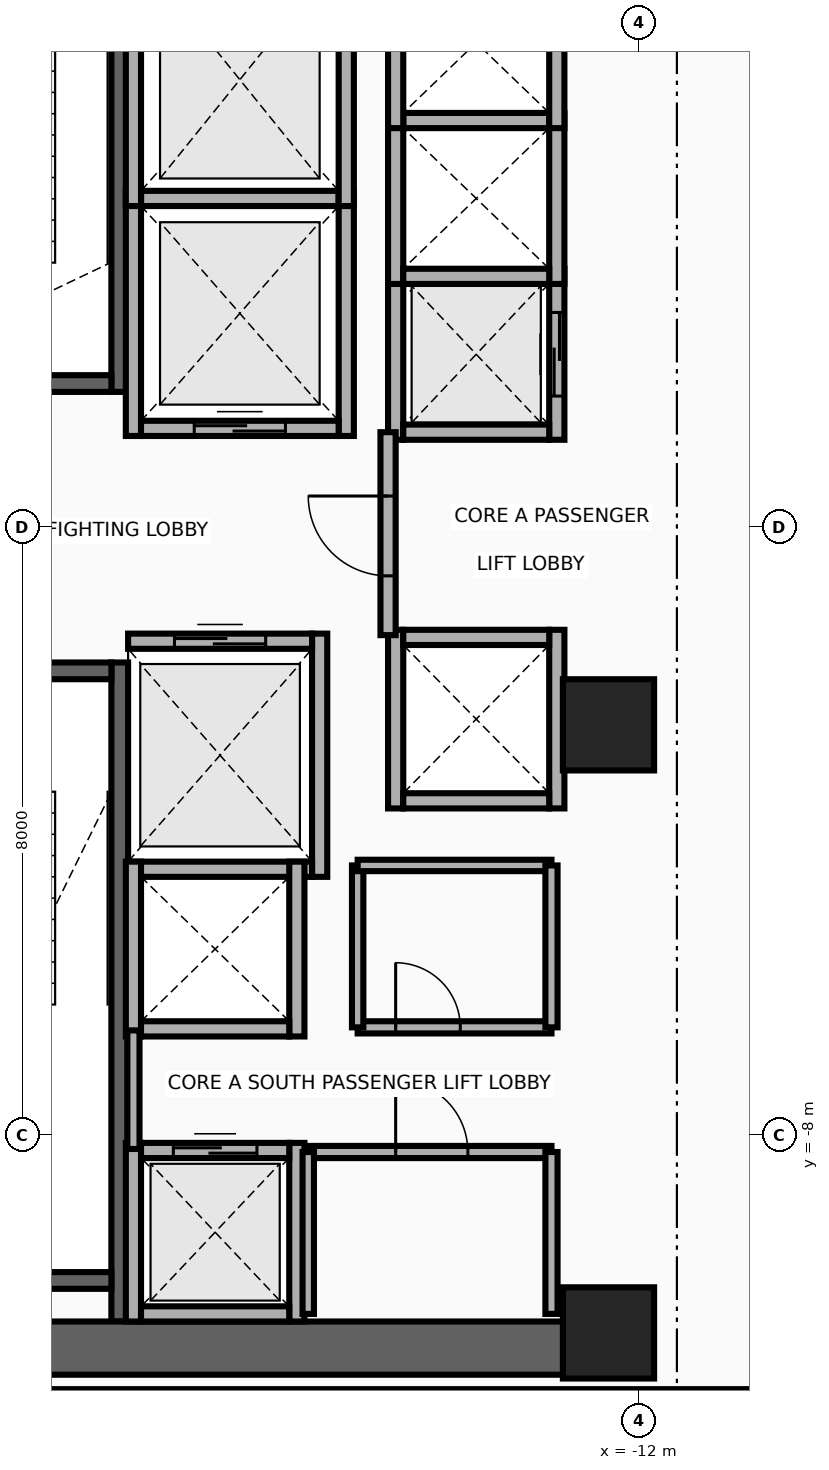
"""IFC4 building model, lengths in metres.
Left out: names, types, materials, properties, quantities, classifications, styles, units other than length and angle.
Written with IfcOpenShell. Run it as: python <this file> out.ifc"""

import sys

from ifc_helpers import new_model, si_unit, direction, frame, frame_2d, origin, origin_2d, place, context, subcontext, project, spatial, rectangle, extrude, source, transform, mapped, element, fill, save


model = new_model("IFC4")
c1 = context("Model", 3, precision=1e-05, world=origin(), true_north=direction((0.0, 1.0)))
c2 = subcontext(c1, "Body", "Model", "MODEL_VIEW")
j1 = project(units=[si_unit("LENGTHUNIT", "METRE"), si_unit("PLANEANGLEUNIT", "RADIAN")], contexts=[c1])
p1 = place(None, origin())
s1 = spatial("IfcSite", under=j1, at=p1, CompositionType="ELEMENT")
p2 = place(p1, origin())
s2 = spatial("IfcBuilding", under=s1, at=p2, CompositionType="ELEMENT")
p3 = place(p2, frame((0.0, 0.0, 127.9)))
s3 = spatial("IfcBuildingStorey", under=s2, at=p3, CompositionType="ELEMENT", Elevation=127.9)
p4 = place(p3, frame((-18.83, 1.78, 0.0), z_axis=(0.0, 0.0, 1.0), x_axis=(0.0, 1.0, 0.0)))
e1 = element("IfcWall", 1, at=p4, inside=s3, PredefinedType="SHEAR", context=c2, shape_type="SweptSolid", body=[
    extrude(rectangle(XDim=8.67, YDim=0.22, at=frame_2d((4.335, 0.0))), origin(), (0.0, 0.0, 1.0), 3.46),
])
p5 = place(p3, frame((-22.05, 1.89, 0.0), z_axis=(0.0, 0.0, 1.0), x_axis=(1.0, 0.0, 0.0)))
e2 = element("IfcWall", 2, at=p5, inside=s3, PredefinedType="SHEAR", context=c2, shape_type="SweptSolid", body=[
    extrude(rectangle(XDim=3.11, YDim=0.22, at=frame_2d((1.555, 0.0))), origin(), (0.0, 0.0, 1.0), 3.46),
])
p6 = place(p5, frame((1.0, 0.0, 0.0)))
e3 = element("IfcOpeningElement", 3, at=p6, cuts=e2, PredefinedType="OPENING", context=c2, shape_type="SweptSolid", body=[
    extrude(rectangle(XDim=1.1, YDim=2.15, at=frame_2d((0.55, 1.075))), frame((0.0, 0.125, 0.0), z_axis=(0.0, -1.0, 0.0), x_axis=(1.0, 0.0, 0.0)), (0.0, 0.0, 1.0), 0.25),
])
p7 = place(p3, frame((-18.83, -10.45, 0.0), z_axis=(0.0, 0.0, 1.0), x_axis=(0.0, 1.0, 0.0)))
e4 = element("IfcWall", 4, at=p7, inside=s3, PredefinedType="SHEAR", context=c2, shape_type="SweptSolid", body=[
    extrude(rectangle(XDim=8.67, YDim=0.22, at=frame_2d((4.335, 0.0))), origin(), (0.0, 0.0, 1.0), 3.46),
])
p8 = place(p3, frame((-22.05, -9.91, 0.0), z_axis=(0.0, 0.0, 1.0), x_axis=(1.0, 0.0, 0.0)))
e5 = element("IfcWall", 5, at=p8, inside=s3, PredefinedType="SHEAR", context=c2, shape_type="SweptSolid", body=[
    extrude(rectangle(XDim=3.11, YDim=0.22, at=frame_2d((1.555, 0.0))), origin(), (0.0, 0.0, 1.0), 3.46),
])
p9 = place(p3, frame((-22.05, -1.89, 0.0), z_axis=(0.0, 0.0, 1.0), x_axis=(1.0, 0.0, 0.0)))
e6 = element("IfcWall", 6, at=p9, inside=s3, PredefinedType="SHEAR", context=c2, shape_type="SweptSolid", body=[
    extrude(rectangle(XDim=3.11, YDim=0.22, at=frame_2d((1.555, 0.0))), origin(), (0.0, 0.0, 1.0), 3.46),
])
p10 = place(p9, frame((1.0, 0.0, 0.0)))
e7 = element("IfcOpeningElement", 7, at=p10, cuts=e6, PredefinedType="OPENING", context=c2, shape_type="SweptSolid", body=[
    extrude(rectangle(XDim=1.1, YDim=2.15, at=frame_2d((0.55, 1.075))), frame((0.0, 0.125, 0.0), z_axis=(0.0, -1.0, 0.0), x_axis=(1.0, 0.0, 0.0)), (0.0, 0.0, 1.0), 0.25),
])
p11 = place(p3, frame((-22.65, -10.8, 0.0), z_axis=(0.0, 0.0, 1.0), x_axis=(1.0, 0.0, 0.0)))
e8 = element("IfcWall", 8, at=p11, inside=s3, PredefinedType="SHEAR", context=c2, shape_type="SweptSolid", body=[
    extrude(rectangle(XDim=10.25, YDim=0.7, at=frame_2d((5.125, 0.0))), origin(), (0.0, 0.0, 1.0), 3.46),
])
m1 = source(origin(), c2, "Body", "SweptSolid", [
    extrude(rectangle(XDim=1.2, YDim=1.2, at=origin_2d()), origin(), (0.0, 0.0, 1.0), 3.7),
])
for number, where, z_axis, x_axis in (
    (9, (-12.4, -10.6, 0.0), (0.0, 0.0, 1.0), (1.0, 0.0, 0.0)),
    (10, (-12.4, -2.6, 0.0), (0.0, 0.0, 1.0), (1.0, 0.0, 0.0)),
):
    element("IfcColumn", number, at=place(p3, frame(where, z_axis=z_axis, x_axis=x_axis)), inside=s3, PredefinedType="COLUMN", context=c2, shape_type="MappedRepresentation", body=[
        mapped(m1, transform((0.0, 0.0, 0.0), x_axis=(1.0, 0.0, 0.0), y_axis=(0.0, 1.0, 0.0), z_axis=(0.0, 0.0, 1.0), scale=1.0)),
    ])
for number, where, z_axis, x_axis in (
    (11, (-18.65, 1.2, 0.0), (0.0, 0.0, 1.0), (0.0, 1.0, 0.0)),
    (12, (-15.85, 1.2, 0.0), (0.0, 0.0, 1.0), (0.0, 1.0, 0.0)),
):
    element("IfcWall", number, at=place(p3, frame(where, z_axis=z_axis, x_axis=x_axis)), inside=s3, PredefinedType="MOVABLE", context=c2, shape_type="SweptSolid", body=[
        extrude(rectangle(XDim=3.225, YDim=0.2, at=frame_2d((1.613, 0.0))), origin(), (0.0, 0.0, 1.0), 3.46),
    ])
p12 = place(p3, frame((-18.55, 1.3, 0.0), z_axis=(0.0, 0.0, 1.0), x_axis=(1.0, 0.0, 0.0)))
e13 = element("IfcWall", 13, at=p12, inside=s3, PredefinedType="MOVABLE", context=c2, shape_type="SweptSolid", body=[
    extrude(rectangle(XDim=2.6, YDim=0.2, at=frame_2d((1.3, 0.0))), origin(), (0.0, 0.0, 1.0), 3.46),
])
p13 = place(p12, frame((0.7, 0.0, 0.0)))
e14 = element("IfcOpeningElement", 14, at=p13, cuts=e13, PredefinedType="OPENING", context=c2, shape_type="SweptSolid", body=[
    extrude(rectangle(XDim=1.2, YDim=2.1, at=frame_2d((0.6, 1.05))), frame((0.0, 0.115, 0.0), z_axis=(0.0, -1.0, 0.0), x_axis=(1.0, 0.0, 0.0)), (0.0, 0.0, 1.0), 0.23),
])
p14 = place(p3, frame((-18.55, 4.325, 0.0), z_axis=(0.0, 0.0, 1.0), x_axis=(1.0, 0.0, 0.0)))
e15 = element("IfcWall", 15, at=p14, inside=s3, PredefinedType="MOVABLE", context=c2, shape_type="SweptSolid", body=[
    extrude(rectangle(XDim=2.6, YDim=0.2, at=frame_2d((1.3, 0.0))), origin(), (0.0, 0.0, 1.0), 3.46),
])
p15 = place(p3, frame((-16.2, -4.6, 0.0), z_axis=(0.0, 0.0, 1.0), x_axis=(0.0, 1.0, 0.0)))
e16 = element("IfcWall", 16, at=p15, inside=s3, PredefinedType="MOVABLE", context=c2, shape_type="SweptSolid", body=[
    extrude(rectangle(XDim=3.2, YDim=0.2, at=frame_2d((1.6, 0.0))), origin(), (0.0, 0.0, 1.0), 3.46),
])
p16 = place(p3, frame((-18.72, -4.5, 0.0), z_axis=(0.0, 0.0, 1.0), x_axis=(1.0, 0.0, 0.0)))
e17 = element("IfcWall", 17, at=p16, inside=s3, PredefinedType="MOVABLE", context=c2, shape_type="SweptSolid", body=[
    extrude(rectangle(XDim=2.42, YDim=0.2, at=frame_2d((1.21, 0.0))), origin(), (0.0, 0.0, 1.0), 3.46),
])
p17 = place(p3, frame((-18.72, -1.5, 0.0), z_axis=(0.0, 0.0, 1.0), x_axis=(1.0, 0.0, 0.0)))
e18 = element("IfcWall", 18, at=p17, inside=s3, PredefinedType="MOVABLE", context=c2, shape_type="SweptSolid", body=[
    extrude(rectangle(XDim=2.42, YDim=0.2, at=frame_2d((1.21, 0.0))), origin(), (0.0, 0.0, 1.0), 3.46),
])
p18 = place(p17, frame((0.61, 0.0, 0.0)))
e19 = element("IfcOpeningElement", 19, at=p18, cuts=e18, PredefinedType="OPENING", context=c2, shape_type="SweptSolid", body=[
    extrude(rectangle(XDim=1.2, YDim=2.1, at=frame_2d((0.6, 1.05))), frame((0.0, 0.115, 0.0), z_axis=(0.0, -1.0, 0.0), x_axis=(1.0, 0.0, 0.0)), (0.0, 0.0, 1.0), 0.23),
])
for number, where, z_axis, x_axis in (
    (20, (-18.65, 4.225, 0.0), (0.0, 0.0, 1.0), (0.0, 1.0, 0.0)),
    (21, (-15.85, 4.225, 0.0), (0.0, 0.0, 1.0), (0.0, 1.0, 0.0)),
):
    element("IfcWall", number, at=place(p3, frame(where, z_axis=z_axis, x_axis=x_axis)), inside=s3, PredefinedType="MOVABLE", context=c2, shape_type="SweptSolid", body=[
        extrude(rectangle(XDim=3.325, YDim=0.2, at=frame_2d((1.663, 0.0))), origin(), (0.0, 0.0, 1.0), 3.46),
    ])
for number, where, z_axis, x_axis in (
    (22, (-18.65, -10.45, 0.0), (0.0, 0.0, 1.0), (0.0, 1.0, 0.0)),
    (23, (-16.5, -10.45, 0.0), (0.0, 0.0, 1.0), (0.0, 1.0, 0.0)),
):
    element("IfcWall", number, at=place(p3, frame(where, z_axis=z_axis, x_axis=x_axis)), inside=s3, PredefinedType="MOVABLE", context=c2, shape_type="SweptSolid", body=[
        extrude(rectangle(XDim=2.35, YDim=0.2, at=frame_2d((1.175, 0.0))), origin(), (0.0, 0.0, 1.0), 2.666),
    ])
p19 = place(p3, frame((-18.55, -10.35, 0.0), z_axis=(0.0, 0.0, 1.0), x_axis=(1.0, 0.0, 0.0)))
e24 = element("IfcWall", 24, at=p19, inside=s3, PredefinedType="MOVABLE", context=c2, shape_type="SweptSolid", body=[
    extrude(rectangle(XDim=1.95, YDim=0.2, at=frame_2d((0.975, 0.0))), origin(), (0.0, 0.0, 1.0), 2.666),
])
p20 = place(p3, frame((-18.55, -8.2, 0.0), z_axis=(0.0, 0.0, 1.0), x_axis=(1.0, 0.0, 0.0)))
e25 = element("IfcWall", 25, at=p20, inside=s3, PredefinedType="MOVABLE", context=c2, shape_type="SweptSolid", body=[
    extrude(rectangle(XDim=1.95, YDim=0.2, at=frame_2d((0.975, 0.0))), origin(), (0.0, 0.0, 1.0), 3.46),
])
p21 = place(p20, frame((0.425, 0.0, 0.0)))
e26 = element("IfcOpeningElement", 26, at=p21, cuts=e25, PredefinedType="OPENING", context=c2, shape_type="SweptSolid", body=[
    extrude(rectangle(XDim=1.1, YDim=2.1, at=frame_2d((0.55, 1.05))), frame((0.0, 0.115, 0.0), z_axis=(0.0, -1.0, 0.0), x_axis=(1.0, 0.0, 0.0)), (0.0, 0.0, 1.0), 0.23),
])
p22 = place(p3, frame((-15.2, 1.15, 0.0), z_axis=(0.0, 0.0, 1.0), x_axis=(0.0, 1.0, 0.0)))
e27 = element("IfcWall", 27, at=p22, inside=s3, PredefinedType="MOVABLE", context=c2, shape_type="SweptSolid", body=[
    extrude(rectangle(XDim=2.25, YDim=0.2, at=frame_2d((1.125, 0.0))), origin(), (0.0, 0.0, 1.0), 3.46),
])
p23 = place(p3, frame((-13.08, 1.15, 0.0), z_axis=(0.0, 0.0, 1.0), x_axis=(0.0, 1.0, 0.0)))
e28 = element("IfcWall", 28, at=p23, inside=s3, PredefinedType="MOVABLE", context=c2, shape_type="SweptSolid", body=[
    extrude(rectangle(XDim=2.25, YDim=0.2, at=frame_2d((1.125, 0.0))), origin(), (0.0, 0.0, 1.0), 3.46),
])
p24 = place(p23, frame((0.575, 0.0, 0.0)))
e29 = element("IfcOpeningElement", 29, at=p24, cuts=e28, PredefinedType="OPENING", context=c2, shape_type="SweptSolid", body=[
    extrude(rectangle(XDim=1.1, YDim=2.1, at=frame_2d((0.55, 1.05))), frame((0.0, 0.115, 0.0), z_axis=(0.0, -1.0, 0.0), x_axis=(1.0, 0.0, 0.0)), (0.0, 0.0, 1.0), 0.23),
])
p25 = place(p3, frame((-15.1, 1.25, 0.0), z_axis=(0.0, 0.0, 1.0), x_axis=(1.0, 0.0, 0.0)))
e30 = element("IfcWall", 30, at=p25, inside=s3, PredefinedType="MOVABLE", context=c2, shape_type="SweptSolid", body=[
    extrude(rectangle(XDim=1.92, YDim=0.2, at=frame_2d((0.96, 0.0))), origin(), (0.0, 0.0, 1.0), 3.46),
])
for number, where, z_axis, x_axis in (
    (31, (-15.2, 3.2, 0.0), (0.0, 0.0, 1.0), (0.0, 1.0, 0.0)),
    (32, (-13.08, 3.2, 0.0), (0.0, 0.0, 1.0), (0.0, 1.0, 0.0)),
):
    element("IfcWall", number, at=place(p3, frame(where, z_axis=z_axis, x_axis=x_axis)), inside=s3, PredefinedType="MOVABLE", context=c2, shape_type="SweptSolid", body=[
        extrude(rectangle(XDim=2.25, YDim=0.2, at=frame_2d((1.125, 0.0))), origin(), (0.0, 0.0, 1.0), 3.46),
    ])
for number, where, z_axis, x_axis in (
    (33, (-15.1, 3.3, 0.0), (0.0, 0.0, 1.0), (1.0, 0.0, 0.0)),
    (34, (-15.1, 5.35, 0.0), (0.0, 0.0, 1.0), (1.0, 0.0, 0.0)),
):
    element("IfcWall", number, at=place(p3, frame(where, z_axis=z_axis, x_axis=x_axis)), inside=s3, PredefinedType="MOVABLE", context=c2, shape_type="SweptSolid", body=[
        extrude(rectangle(XDim=1.92, YDim=0.2, at=frame_2d((0.96, 0.0))), origin(), (0.0, 0.0, 1.0), 3.46),
    ])
for number, where, z_axis, x_axis in (
    (35, (-15.2, 5.25, 0.0), (0.0, 0.0, 1.0), (0.0, 1.0, 0.0)),
    (36, (-13.08, 5.25, 0.0), (0.0, 0.0, 1.0), (0.0, 1.0, 0.0)),
):
    element("IfcWall", number, at=place(p3, frame(where, z_axis=z_axis, x_axis=x_axis)), inside=s3, PredefinedType="MOVABLE", context=c2, shape_type="SweptSolid", body=[
        extrude(rectangle(XDim=2.25, YDim=0.2, at=frame_2d((1.125, 0.0))), origin(), (0.0, 0.0, 1.0), 3.46),
    ])
for number, where, z_axis, x_axis in (
    (37, (-18.65, -6.7, 0.0), (0.0, 0.0, 1.0), (0.0, 1.0, 0.0)),
    (38, (-16.5, -6.7, 0.0), (0.0, 0.0, 1.0), (0.0, 1.0, 0.0)),
):
    element("IfcWall", number, at=place(p3, frame(where, z_axis=z_axis, x_axis=x_axis)), inside=s3, PredefinedType="MOVABLE", context=c2, shape_type="SweptSolid", body=[
        extrude(rectangle(XDim=2.3, YDim=0.2, at=frame_2d((1.15, 0.0))), origin(), (0.0, 0.0, 1.0), 3.46),
    ])
p26 = place(p3, frame((-18.55, -6.6, 0.0), z_axis=(0.0, 0.0, 1.0), x_axis=(1.0, 0.0, 0.0)))
e39 = element("IfcWall", 39, at=p26, inside=s3, PredefinedType="MOVABLE", context=c2, shape_type="SweptSolid", body=[
    extrude(rectangle(XDim=1.95, YDim=0.2, at=frame_2d((0.975, 0.0))), origin(), (0.0, 0.0, 1.0), 3.46),
])
for number, where, z_axis, x_axis in (
    (40, (-15.2, -3.7, 0.0), (0.0, 0.0, 1.0), (0.0, 1.0, 0.0)),
    (41, (-13.08, -3.7, 0.0), (0.0, 0.0, 1.0), (0.0, 1.0, 0.0)),
):
    element("IfcWall", number, at=place(p3, frame(where, z_axis=z_axis, x_axis=x_axis)), inside=s3, PredefinedType="MOVABLE", context=c2, shape_type="SweptSolid", body=[
        extrude(rectangle(XDim=2.35, YDim=0.2, at=frame_2d((1.175, 0.0))), origin(), (0.0, 0.0, 1.0), 3.46),
    ])
for number, where, z_axis, x_axis in (
    (42, (-15.1, -3.6, 0.0), (0.0, 0.0, 1.0), (1.0, 0.0, 0.0)),
    (43, (-15.1, -1.45, 0.0), (0.0, 0.0, 1.0), (1.0, 0.0, 0.0)),
):
    element("IfcWall", number, at=place(p3, frame(where, z_axis=z_axis, x_axis=x_axis)), inside=s3, PredefinedType="MOVABLE", context=c2, shape_type="SweptSolid", body=[
        extrude(rectangle(XDim=1.92, YDim=0.2, at=frame_2d((0.96, 0.0))), origin(), (0.0, 0.0, 1.0), 3.46),
    ])
p27 = place(p3, frame((-15.3, -1.42, 0.0), z_axis=(0.0, 0.0, 1.0), x_axis=(0.0, 1.0, 0.0)))
e44 = element("IfcWall", 44, at=p27, inside=s3, PredefinedType="PARTITIONING", context=c2, shape_type="SweptSolid", body=[
    extrude(rectangle(XDim=2.67, YDim=0.2, at=frame_2d((1.335, 0.0))), origin(), (0.0, 0.0, 1.0), 3.46),
])
p28 = place(p27, frame((0.78, 0.0, 0.0)))
e45 = element("IfcOpeningElement", 45, at=p28, cuts=e44, PredefinedType="OPENING", context=c2, shape_type="SweptSolid", body=[
    extrude(rectangle(XDim=1.05, YDim=2.15, at=frame_2d((0.525, 1.075))), frame((0.0, 0.115, 0.0), z_axis=(0.0, -1.0, 0.0), x_axis=(1.0, 0.0, 0.0)), (0.0, 0.0, 1.0), 0.23),
])
p29 = place(p3, frame((-18.65, -8.18, 0.0), z_axis=(0.0, 0.0, 1.0), x_axis=(0.0, 1.0, 0.0)))
e46 = element("IfcWall", 46, at=p29, inside=s3, PredefinedType="PARTITIONING", context=c2, shape_type="SweptSolid", body=[
    extrude(rectangle(XDim=1.56, YDim=0.16, at=frame_2d((0.78, 0.0))), origin(), (0.0, 0.0, 1.0), 3.46),
])
p30 = place(p3, frame((-16.35, -8.22, 0.0), z_axis=(0.0, 0.0, 1.0), x_axis=(1.0, 0.0, 0.0)))
e47 = element("IfcWall", 47, at=p30, inside=s3, PredefinedType="PARTITIONING", context=c2, shape_type="SweptSolid", body=[
    extrude(rectangle(XDim=3.2, YDim=0.16, at=frame_2d((1.6, 0.0))), origin(), (0.0, 0.0, 1.0), 3.46),
])
p31 = place(p30, frame((1.15, 0.0, 0.0)))
e48 = element("IfcOpeningElement", 48, at=p31, cuts=e47, PredefinedType="OPENING", context=c2, shape_type="SweptSolid", body=[
    extrude(rectangle(XDim=0.95, YDim=2.15, at=frame_2d((0.475, 1.075))), frame((0.0, 0.095, 0.0), z_axis=(0.0, -1.0, 0.0), x_axis=(1.0, 0.0, 0.0)), (0.0, 0.0, 1.0), 0.19),
])
p32 = place(p3, frame((-16.35, -10.35, 0.0), z_axis=(0.0, 0.0, 1.0), x_axis=(0.0, 1.0, 0.0)))
e49 = element("IfcWall", 49, at=p32, inside=s3, PredefinedType="PARTITIONING", context=c2, shape_type="SweptSolid", body=[
    extrude(rectangle(XDim=2.13, YDim=0.15, at=frame_2d((1.065, 0.0))), origin(), (0.0, 0.0, 1.0), 3.46),
])
p33 = place(p3, frame((-13.15, -10.35, 0.0), z_axis=(0.0, 0.0, 1.0), x_axis=(0.0, 1.0, 0.0)))
e50 = element("IfcWall", 50, at=p33, inside=s3, PredefinedType="PARTITIONING", context=c2, shape_type="SweptSolid", body=[
    extrude(rectangle(XDim=2.13, YDim=0.16, at=frame_2d((1.065, 0.0))), origin(), (0.0, 0.0, 1.0), 3.46),
])
p34 = place(p3, frame((-15.7, -6.58, 0.0), z_axis=(0.0, 0.0, 1.0), x_axis=(1.0, 0.0, 0.0)))
e51 = element("IfcWall", 51, at=p34, inside=s3, PredefinedType="PARTITIONING", context=c2, shape_type="SweptSolid", body=[
    extrude(rectangle(XDim=2.55, YDim=0.16, at=frame_2d((1.275, 0.0))), origin(), (0.0, 0.0, 1.0), 3.46),
])
p35 = place(p34, frame((0.5, 0.0, 0.0)))
e52 = element("IfcOpeningElement", 52, at=p35, cuts=e51, PredefinedType="OPENING", context=c2, shape_type="SweptSolid", body=[
    extrude(rectangle(XDim=0.85, YDim=2.05, at=frame_2d((0.425, 1.025))), frame((0.0, 0.095, 0.0), z_axis=(0.0, -1.0, 0.0), x_axis=(1.0, 0.0, 0.0)), (0.0, 0.0, 1.0), 0.19),
])
p36 = place(p3, frame((-15.7, -6.58, 0.0), z_axis=(0.0, 0.0, 1.0), x_axis=(0.0, 1.0, 0.0)))
e53 = element("IfcWall", 53, at=p36, inside=s3, PredefinedType="PARTITIONING", context=c2, shape_type="SweptSolid", body=[
    extrude(rectangle(XDim=2.13, YDim=0.15, at=frame_2d((1.065, 0.0))), origin(), (0.0, 0.0, 1.0), 3.46),
])
p37 = place(p3, frame((-15.7, -4.45, 0.0), z_axis=(0.0, 0.0, 1.0), x_axis=(1.0, 0.0, 0.0)))
e54 = element("IfcWall", 54, at=p37, inside=s3, PredefinedType="PARTITIONING", context=c2, shape_type="SweptSolid", body=[
    extrude(rectangle(XDim=2.55, YDim=0.15, at=frame_2d((1.275, 0.0))), origin(), (0.0, 0.0, 1.0), 3.46),
])
p38 = place(p3, frame((-13.15, -6.58, 0.0), z_axis=(0.0, 0.0, 1.0), x_axis=(0.0, 1.0, 0.0)))
e55 = element("IfcWall", 55, at=p38, inside=s3, PredefinedType="PARTITIONING", context=c2, shape_type="SweptSolid", body=[
    extrude(rectangle(XDim=2.13, YDim=0.16, at=frame_2d((1.065, 0.0))), origin(), (0.0, 0.0, 1.0), 3.46),
])
p39 = place(p3, frame((-23.45, -11.42, 0.0), z_axis=(0.0, 0.0, 1.0), x_axis=(1.0, 0.0, 0.0)))
e56 = element("IfcWall", 56, at=p39, inside=s3, PredefinedType="PARTITIONING", context=c2, shape_type="SweptSolid", body=[
    extrude(rectangle(XDim=13.84, YDim=0.16, at=frame_2d((6.92, 0.0))), origin(), (0.0, 0.0, 1.0), 2.834),
])
p40 = place(p13, origin())
e57 = element("IfcDoor", 57, at=p40, inside=s3, OperationType="DOUBLE_DOOR_SLIDING", PredefinedType="DOOR", context=c2, shape_type="SweptSolid", body=[
    extrude(rectangle(XDim=1.2, YDim=2.1, at=frame_2d((0.6, 1.05))), frame((0.0, 0.025, 0.0), z_axis=(0.0, -1.0, 0.0), x_axis=(1.0, 0.0, 0.0)), (0.0, 0.0, 1.0), 0.05),
])
fill(e14, e57)
p41 = place(p18, origin())
e58 = element("IfcDoor", 58, at=p41, inside=s3, OperationType="DOUBLE_DOOR_SLIDING", PredefinedType="DOOR", context=c2, shape_type="SweptSolid", body=[
    extrude(rectangle(XDim=1.2, YDim=2.1, at=frame_2d((0.6, 1.05))), frame((0.0, 0.025, 0.0), z_axis=(0.0, -1.0, 0.0), x_axis=(1.0, 0.0, 0.0)), (0.0, 0.0, 1.0), 0.05),
])
fill(e19, e58)
p42 = place(p21, origin())
e59 = element("IfcDoor", 59, at=p42, inside=s3, OperationType="DOUBLE_DOOR_SLIDING", PredefinedType="DOOR", context=c2, shape_type="SweptSolid", body=[
    extrude(rectangle(XDim=1.1, YDim=2.1, at=frame_2d((0.55, 1.05))), frame((0.0, 0.025, 0.0), z_axis=(0.0, -1.0, 0.0), x_axis=(1.0, 0.0, 0.0)), (0.0, 0.0, 1.0), 0.05),
])
fill(e26, e59)
p43 = place(p24, origin())
e60 = element("IfcDoor", 60, at=p43, inside=s3, OperationType="DOUBLE_DOOR_SLIDING", PredefinedType="DOOR", context=c2, shape_type="SweptSolid", body=[
    extrude(rectangle(XDim=1.1, YDim=2.1, at=frame_2d((0.55, 1.05))), frame((0.0, 0.025, 0.0), z_axis=(0.0, -1.0, 0.0), x_axis=(1.0, 0.0, 0.0)), (0.0, 0.0, 1.0), 0.05),
])
fill(e29, e60)
p44 = place(p28, origin())
e61 = element("IfcDoor", 61, at=p44, inside=s3, OperationType="SINGLE_SWING_RIGHT", PredefinedType="DOOR", context=c2, shape_type="SweptSolid", body=[
    extrude(rectangle(XDim=1.05, YDim=2.15, at=frame_2d((0.525, 1.075))), frame((0.0, 0.025, 0.0), z_axis=(0.0, -1.0, 0.0), x_axis=(1.0, 0.0, 0.0)), (0.0, 0.0, 1.0), 0.05),
])
fill(e45, e61)
p45 = place(p31, origin())
e62 = element("IfcDoor", 62, at=p45, inside=s3, OperationType="SINGLE_SWING_LEFT", PredefinedType="DOOR", context=c2, shape_type="SweptSolid", body=[
    extrude(rectangle(XDim=0.95, YDim=2.15, at=frame_2d((0.475, 1.075))), frame((0.0, 0.025, 0.0), z_axis=(0.0, -1.0, 0.0), x_axis=(1.0, 0.0, 0.0)), (0.0, 0.0, 1.0), 0.05),
])
fill(e48, e62)
p46 = place(p35, origin())
e63 = element("IfcDoor", 63, at=p46, inside=s3, OperationType="SINGLE_SWING_RIGHT", PredefinedType="DOOR", context=c2, shape_type="SweptSolid", body=[
    extrude(rectangle(XDim=0.85, YDim=2.05, at=frame_2d((0.425, 1.025))), frame((0.0, 0.025, 0.0), z_axis=(0.0, -1.0, 0.0), x_axis=(1.0, 0.0, 0.0)), (0.0, 0.0, 1.0), 0.05),
])
fill(e52, e63)
save(model, sys.argv[1])
